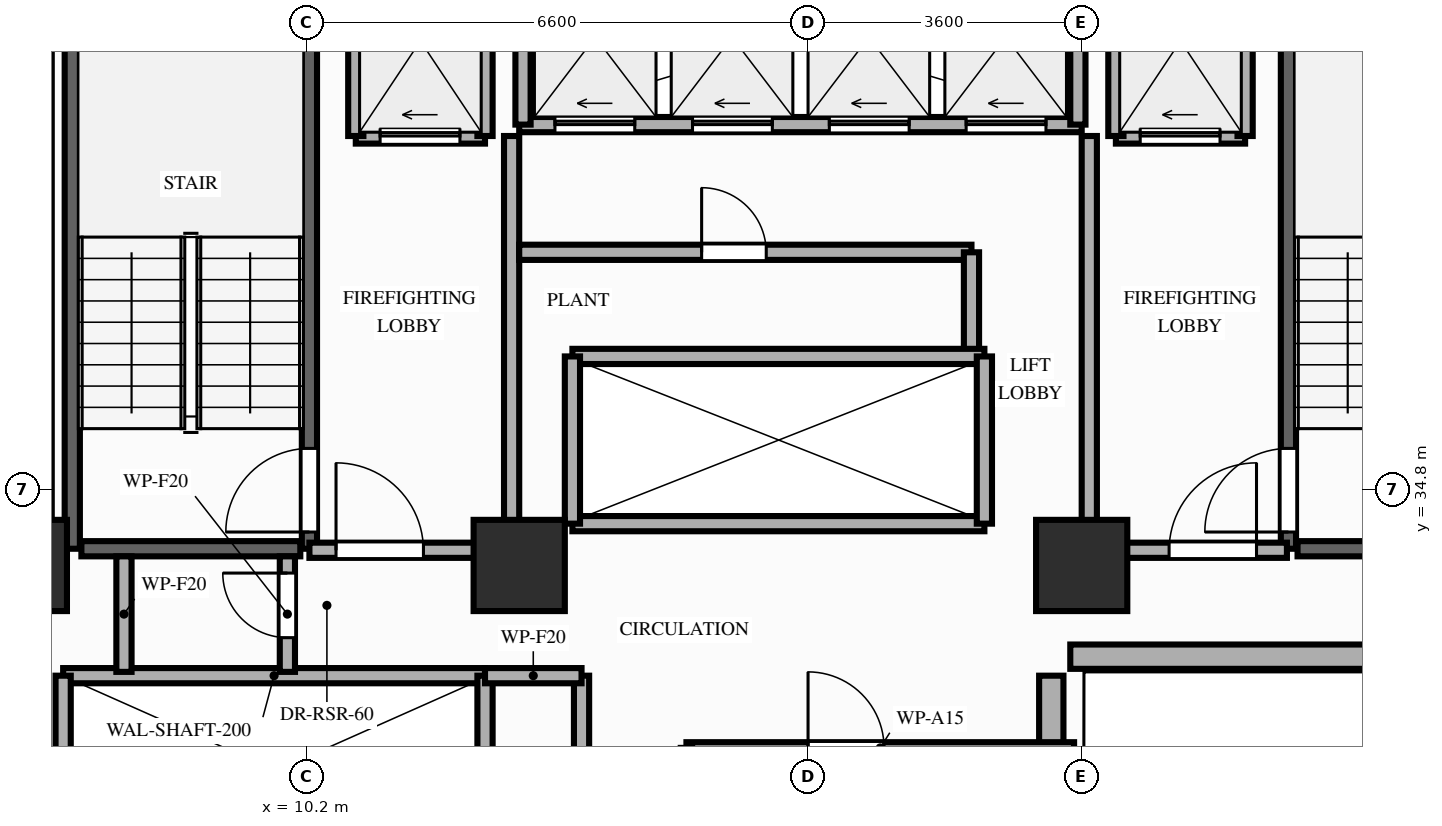
"""IFC4 building model, lengths in metres.
Left out: names, types, materials, properties, quantities, classifications, styles, units other than length and angle.
Written with IfcOpenShell. Run it as: python <this file> out.ifc"""

import sys

from ifc_helpers import new_model, si_unit, direction, frame, frame_2d, origin, origin_2d, place, context, subcontext, project, spatial, rectangle, extrude, element, fill, save


model = new_model("IFC4")
c1 = context("Model", 3, precision=1e-05, world=origin(), true_north=direction((0.0, 1.0)))
c2 = subcontext(c1, "Body", "Model", "MODEL_VIEW")
j1 = project(units=[si_unit("LENGTHUNIT", "METRE"), si_unit("PLANEANGLEUNIT", "RADIAN")], contexts=[c1])
p1 = place(None, origin())
s1 = spatial("IfcSite", under=j1, at=p1, CompositionType="ELEMENT")
p2 = place(p1, origin())
s2 = spatial("IfcBuilding", under=s1, at=p2, CompositionType="ELEMENT")
p3 = place(p2, frame((0.0, 0.0, 30.2)))
s3 = spatial("IfcBuildingStorey", under=s2, at=p3, CompositionType="ELEMENT", Elevation=30.2)
for number, where, z_axis, x_axis in (
    (1, (6.45, 33.8, 0.0), (0.0, 0.0, 1.0), (1.0, 0.0, 0.0)),
    (2, (13.0, 33.8, 0.0), (0.0, 0.0, 1.0), (1.0, 0.0, 0.0)),
    (3, (20.4, 33.8, 0.0), (0.0, 0.0, 1.0), (1.0, 0.0, 0.0)),
):
    element("IfcColumn", number, at=place(p3, frame(where, z_axis=z_axis, x_axis=x_axis)), inside=s3, PredefinedType="COLUMN", context=c2, shape_type="SweptSolid", body=[
        extrude(rectangle(XDim=1.2, YDim=1.2, at=origin_2d()), origin(), (0.0, 0.0, 1.0), 3.2),
    ])
p4 = place(p3, frame((20.0, 8.8, 0.0), z_axis=(0.0, 0.0, 1.0), x_axis=(0.0, 1.0, 0.0)))
e4 = element("IfcWall", 4, at=p4, inside=s3, PredefinedType="STANDARD", context=c2, shape_type="SweptSolid", body=[
    extrude(rectangle(XDim=23.55, YDim=0.32, at=frame_2d((11.775, 0.0))), origin(), (0.0, 0.0, 1.0), 2.41),
])
p5 = place(p4, frame((12.61, 0.0, 0.85)))
e5 = element("IfcOpeningElement", 5, at=p5, cuts=e4, PredefinedType="OPENING", context=c2, shape_type="SweptSolid", body=[
    extrude(rectangle(XDim=1.1, YDim=1.31, at=frame_2d((0.55, 0.655))), frame((0.0, 0.17, 0.0), z_axis=(0.0, -1.0, 0.0), x_axis=(1.0, 0.0, 0.0)), (0.0, 0.0, 1.0), 0.34),
])
p6 = place(p4, frame((5.15, 0.0, 0.85)))
e6 = element("IfcOpeningElement", 6, at=p6, cuts=e4, PredefinedType="OPENING", context=c2, shape_type="SweptSolid", body=[
    extrude(rectangle(XDim=2.4, YDim=1.31, at=frame_2d((1.2, 0.655))), frame((0.0, 0.17, 0.0), z_axis=(0.0, -1.0, 0.0), x_axis=(1.0, 0.0, 0.0)), (0.0, 0.0, 1.0), 0.34),
])
p7 = place(p3, frame((20.25, 32.6, 0.0), z_axis=(0.0, 0.0, 1.0), x_axis=(1.0, 0.0, 0.0)))
e7 = element("IfcWall", 7, at=p7, inside=s3, PredefinedType="STANDARD", context=c2, shape_type="SweptSolid", body=[
    extrude(rectangle(XDim=7.35, YDim=0.32, at=frame_2d((3.675, 0.0))), origin(), (0.0, 0.0, 1.0), 2.41),
])
p8 = place(p3, frame((7.12, 34.02, 0.0), z_axis=(0.0, 0.0, 1.0), x_axis=(0.0, 1.0, 0.0)))
e8 = element("IfcWall", 8, at=p8, inside=s3, PredefinedType="SHEAR", context=c2, shape_type="SweptSolid", body=[
    extrude(rectangle(XDim=7.78, YDim=0.2, at=frame_2d((3.89, 0.0))), origin(), (0.0, 0.0, 1.0), 3.02),
])
p9 = place(p3, frame((10.24, 34.02, 0.0), z_axis=(0.0, 0.0, 1.0), x_axis=(0.0, 1.0, 0.0)))
e9 = element("IfcWall", 9, at=p9, inside=s3, PredefinedType="SHEAR", context=c2, shape_type="SweptSolid", body=[
    extrude(rectangle(XDim=7.78, YDim=0.2, at=frame_2d((3.89, 0.0))), origin(), (0.0, 0.0, 1.0), 3.02),
])
p10 = place(p9, frame((0.22, 0.0, 0.0)))
e10 = element("IfcOpeningElement", 10, at=p10, cuts=e9, PredefinedType="OPENING", context=c2, shape_type="SweptSolid", body=[
    extrude(rectangle(XDim=1.1, YDim=2.15, at=frame_2d((0.55, 1.075))), frame((0.0, 0.11, 0.0), z_axis=(0.0, -1.0, 0.0), x_axis=(1.0, 0.0, 0.0)), (0.0, 0.0, 1.0), 0.22),
])
p11 = place(p3, frame((7.24, 34.02, 0.0), z_axis=(0.0, 0.0, 1.0), x_axis=(1.0, 0.0, 0.0)))
e11 = element("IfcWall", 11, at=p11, inside=s3, PredefinedType="SHEAR", context=c2, shape_type="SweptSolid", body=[
    extrude(rectangle(XDim=2.88, YDim=0.2, at=frame_2d((1.44, 0.0))), origin(), (0.0, 0.0, 1.0), 3.02),
])
p12 = place(p3, frame((23.12, 34.02, 0.0), z_axis=(0.0, 0.0, 1.0), x_axis=(0.0, 1.0, 0.0)))
e12 = element("IfcWall", 12, at=p12, inside=s3, PredefinedType="SHEAR", context=c2, shape_type="SweptSolid", body=[
    extrude(rectangle(XDim=7.78, YDim=0.2, at=frame_2d((3.89, 0.0))), origin(), (0.0, 0.0, 1.0), 3.02),
])
p13 = place(p12, frame((0.22, 0.0, 0.0)))
e13 = element("IfcOpeningElement", 13, at=p13, cuts=e12, PredefinedType="OPENING", context=c2, shape_type="SweptSolid", body=[
    extrude(rectangle(XDim=1.1, YDim=2.15, at=frame_2d((0.55, 1.075))), frame((0.0, 0.11, 0.0), z_axis=(0.0, -1.0, 0.0), x_axis=(1.0, 0.0, 0.0)), (0.0, 0.0, 1.0), 0.22),
])
p14 = place(p3, frame((23.24, 34.02, 0.0), z_axis=(0.0, 0.0, 1.0), x_axis=(1.0, 0.0, 0.0)))
e14 = element("IfcWall", 14, at=p14, inside=s3, PredefinedType="SHEAR", context=c2, shape_type="SweptSolid", body=[
    extrude(rectangle(XDim=2.88, YDim=0.2, at=frame_2d((1.44, 0.0))), origin(), (0.0, 0.0, 1.0), 3.02),
])
p15 = place(p3, frame((7.0, 32.35, 0.0), z_axis=(0.0, 0.0, 1.0), x_axis=(1.0, 0.0, 0.0)))
e15 = element("IfcWall", 15, at=p15, inside=s3, PredefinedType="MOVABLE", context=c2, shape_type="SweptSolid", body=[
    extrude(rectangle(XDim=5.55, YDim=0.2, at=frame_2d((2.775, 0.0))), origin(), (0.0, 0.0, 1.0), 3.02),
])
for number, where, z_axis, x_axis in (
    (16, (7.0, 29.85, 0.0), (0.0, 0.0, 1.0), (0.0, 1.0, 0.0)),
    (17, (12.55, 29.85, 0.0), (0.0, 0.0, 1.0), (0.0, 1.0, 0.0)),
):
    element("IfcWall", number, at=place(p3, frame(where, z_axis=z_axis, x_axis=x_axis)), inside=s3, PredefinedType="MOVABLE", context=c2, shape_type="SweptSolid", body=[
        extrude(rectangle(XDim=2.5, YDim=0.2, at=frame_2d((1.25, 0.0))), origin(), (0.0, 0.0, 1.0), 3.02),
    ])
p16 = place(p3, frame((10.85, 39.45, 0.0), z_axis=(0.0, 0.0, 1.0), x_axis=(1.0, 0.0, 0.0)))
e18 = element("IfcWall", 18, at=p16, inside=s3, PredefinedType="MOVABLE", context=c2, shape_type="SweptSolid", body=[
    extrude(rectangle(XDim=1.7, YDim=0.2, at=frame_2d((0.85, 0.0))), origin(), (0.0, 0.0, 1.0), 3.02),
])
p17 = place(p16, frame((0.32, 0.0, 0.0)))
e19 = element("IfcOpeningElement", 19, at=p17, cuts=e18, PredefinedType="OPENING", context=c2, shape_type="SweptSolid", body=[
    extrude(rectangle(XDim=1.05, YDim=2.15, at=frame_2d((0.525, 1.075))), frame((0.0, 0.11, 0.0), z_axis=(0.0, -1.0, 0.0), x_axis=(1.0, 0.0, 0.0)), (0.0, 0.0, 1.0), 0.22),
])
p18 = place(p3, frame((20.85, 39.45, 0.0), z_axis=(0.0, 0.0, 1.0), x_axis=(1.0, 0.0, 0.0)))
e20 = element("IfcWall", 20, at=p18, inside=s3, PredefinedType="MOVABLE", context=c2, shape_type="SweptSolid", body=[
    extrude(rectangle(XDim=1.7, YDim=0.2, at=frame_2d((0.85, 0.0))), origin(), (0.0, 0.0, 1.0), 3.02),
])
p19 = place(p18, frame((0.32, 0.0, 0.0)))
e21 = element("IfcOpeningElement", 21, at=p19, cuts=e20, PredefinedType="OPENING", context=c2, shape_type="SweptSolid", body=[
    extrude(rectangle(XDim=1.05, YDim=2.15, at=frame_2d((0.525, 1.075))), frame((0.0, 0.11, 0.0), z_axis=(0.0, -1.0, 0.0), x_axis=(1.0, 0.0, 0.0)), (0.0, 0.0, 1.0), 0.22),
])
for number, where, z_axis, x_axis in (
    (22, (10.85, 39.45, 0.0), (0.0, 0.0, 1.0), (0.0, 1.0, 0.0)),
    (23, (12.55, 39.45, 0.0), (0.0, 0.0, 1.0), (0.0, 1.0, 0.0)),
):
    element("IfcWall", number, at=place(p3, frame(where, z_axis=z_axis, x_axis=x_axis)), inside=s3, PredefinedType="MOVABLE", context=c2, shape_type="SweptSolid", body=[
        extrude(rectangle(XDim=2.65, YDim=0.2, at=frame_2d((1.325, 0.0))), origin(), (0.0, 0.0, 1.0), 2.41),
    ])
p20 = place(p3, frame((12.9, 34.0, 0.0), z_axis=(0.0, 0.0, 1.0), x_axis=(0.0, 1.0, 0.0)))
e24 = element("IfcWall", 24, at=p20, inside=s3, PredefinedType="PARTITIONING", context=c2, shape_type="SweptSolid", body=[
    extrude(rectangle(XDim=5.45, YDim=0.2, at=frame_2d((2.725, 0.0))), origin(), (0.0, 0.0, 1.0), 2.41),
])
p21 = place(p3, frame((10.24, 34.0, 0.0), z_axis=(0.0, 0.0, 1.0), x_axis=(1.0, 0.0, 0.0)))
e25 = element("IfcWall", 25, at=p21, inside=s3, PredefinedType="PARTITIONING", context=c2, shape_type="SweptSolid", body=[
    extrude(rectangle(XDim=2.66, YDim=0.2, at=frame_2d((1.33, 0.0))), origin(), (0.0, 0.0, 1.0), 2.41),
])
p22 = place(p21, frame((0.35, 0.0, 0.0)))
e26 = element("IfcOpeningElement", 26, at=p22, cuts=e25, PredefinedType="OPENING", context=c2, shape_type="SweptSolid", body=[
    extrude(rectangle(XDim=1.15, YDim=2.15, at=frame_2d((0.575, 1.075))), frame((0.0, 0.11, 0.0), z_axis=(0.0, -1.0, 0.0), x_axis=(1.0, 0.0, 0.0)), (0.0, 0.0, 1.0), 0.22),
])
for number, where, z_axis, x_axis in (
    (27, (20.85, 39.45, 0.0), (0.0, 0.0, 1.0), (0.0, 1.0, 0.0)),
    (28, (22.55, 39.45, 0.0), (0.0, 0.0, 1.0), (0.0, 1.0, 0.0)),
):
    element("IfcWall", number, at=place(p3, frame(where, z_axis=z_axis, x_axis=x_axis)), inside=s3, PredefinedType="MOVABLE", context=c2, shape_type="SweptSolid", body=[
        extrude(rectangle(XDim=2.65, YDim=0.2, at=frame_2d((1.325, 0.0))), origin(), (0.0, 0.0, 1.0), 2.41),
    ])
p23 = place(p3, frame((20.5, 34.0, 0.0), z_axis=(0.0, 0.0, 1.0), x_axis=(0.0, 1.0, 0.0)))
e29 = element("IfcWall", 29, at=p23, inside=s3, PredefinedType="PARTITIONING", context=c2, shape_type="SweptSolid", body=[
    extrude(rectangle(XDim=5.45, YDim=0.2, at=frame_2d((2.725, 0.0))), origin(), (0.0, 0.0, 1.0), 2.41),
])
p24 = place(p3, frame((20.5, 34.0, 0.0), z_axis=(0.0, 0.0, 1.0), x_axis=(1.0, 0.0, 0.0)))
e30 = element("IfcWall", 30, at=p24, inside=s3, PredefinedType="PARTITIONING", context=c2, shape_type="SweptSolid", body=[
    extrude(rectangle(XDim=2.6, YDim=0.2, at=frame_2d((1.3, 0.0))), origin(), (0.0, 0.0, 1.0), 2.41),
])
p25 = place(p24, frame((1.05, 0.0, 0.0)))
e31 = element("IfcOpeningElement", 31, at=p25, cuts=e30, PredefinedType="OPENING", context=c2, shape_type="SweptSolid", body=[
    extrude(rectangle(XDim=1.15, YDim=2.15, at=frame_2d((0.575, 1.075))), frame((0.0, 0.11, 0.0), z_axis=(0.0, -1.0, 0.0), x_axis=(1.0, 0.0, 0.0)), (0.0, 0.0, 1.0), 0.22),
])
p26 = place(p3, frame((13.82, 29.85, 0.0), z_axis=(0.0, 0.0, 1.0), x_axis=(0.0, 1.0, 0.0)))
e32 = element("IfcWall", 32, at=p26, inside=s3, PredefinedType="PARTITIONING", context=c2, shape_type="SweptSolid", body=[
    extrude(rectangle(XDim=2.5, YDim=0.2, at=frame_2d((1.25, 0.0))), origin(), (0.0, 0.0, 1.0), 3.02),
])
p27 = place(p3, frame((12.55, 32.35, 0.0), z_axis=(0.0, 0.0, 1.0), x_axis=(1.0, 0.0, 0.0)))
e33 = element("IfcWall", 33, at=p27, inside=s3, PredefinedType="PARTITIONING", context=c2, shape_type="SweptSolid", body=[
    extrude(rectangle(XDim=1.27, YDim=0.2, at=frame_2d((0.635, 0.0))), origin(), (0.0, 0.0, 1.0), 3.02),
])
p28 = place(p3, frame((7.8, 32.4, 0.0), z_axis=(0.0, 0.0, 1.0), x_axis=(0.0, 1.0, 0.0)))
e34 = element("IfcWall", 34, at=p28, inside=s3, PredefinedType="PARTITIONING", context=c2, shape_type="SweptSolid", body=[
    extrude(rectangle(XDim=1.52, YDim=0.2, at=frame_2d((0.76, 0.0))), origin(), (0.0, 0.0, 1.0), 2.41),
])
p29 = place(p3, frame((9.95, 32.4, 0.0), z_axis=(0.0, 0.0, 1.0), x_axis=(0.0, 1.0, 0.0)))
e35 = element("IfcWall", 35, at=p29, inside=s3, PredefinedType="PARTITIONING", context=c2, shape_type="SweptSolid", body=[
    extrude(rectangle(XDim=1.52, YDim=0.2, at=frame_2d((0.76, 0.0))), origin(), (0.0, 0.0, 1.0), 2.41),
])
p30 = place(p29, frame((0.45, 0.0, 0.0)))
e36 = element("IfcOpeningElement", 36, at=p30, cuts=e35, PredefinedType="OPENING", context=c2, shape_type="SweptSolid", body=[
    extrude(rectangle(XDim=0.85, YDim=2.05, at=frame_2d((0.425, 1.025))), frame((0.0, 0.11, 0.0), z_axis=(0.0, -1.0, 0.0), x_axis=(1.0, 0.0, 0.0)), (0.0, 0.0, 1.0), 0.22),
])
p31 = place(p3, frame((13.0, 39.6, 0.0), z_axis=(0.0, 0.0, 1.0), x_axis=(1.0, 0.0, 0.0)))
e37 = element("IfcWall", 37, at=p31, inside=s3, PredefinedType="MOVABLE", context=c2, shape_type="SweptSolid", body=[
    extrude(rectangle(XDim=7.4, YDim=0.2, at=frame_2d((3.7, 0.0))), origin(), (0.0, 0.0, 1.0), 3.02),
])
p32 = place(p31, frame((0.47, 0.0, 0.0)))
e38 = element("IfcOpeningElement", 38, at=p32, cuts=e37, PredefinedType="OPENING", context=c2, shape_type="SweptSolid", body=[
    extrude(rectangle(XDim=1.05, YDim=2.15, at=frame_2d((0.525, 1.075))), frame((0.0, 0.11, 0.0), z_axis=(0.0, -1.0, 0.0), x_axis=(1.0, 0.0, 0.0)), (0.0, 0.0, 1.0), 0.22),
])
p33 = place(p31, frame((2.28, 0.0, 0.0)))
e39 = element("IfcOpeningElement", 39, at=p33, cuts=e37, PredefinedType="OPENING", context=c2, shape_type="SweptSolid", body=[
    extrude(rectangle(XDim=1.05, YDim=2.15, at=frame_2d((0.525, 1.075))), frame((0.0, 0.11, 0.0), z_axis=(0.0, -1.0, 0.0), x_axis=(1.0, 0.0, 0.0)), (0.0, 0.0, 1.0), 0.22),
])
p34 = place(p31, frame((4.08, 0.0, 0.0)))
e40 = element("IfcOpeningElement", 40, at=p34, cuts=e37, PredefinedType="OPENING", context=c2, shape_type="SweptSolid", body=[
    extrude(rectangle(XDim=1.05, YDim=2.15, at=frame_2d((0.525, 1.075))), frame((0.0, 0.11, 0.0), z_axis=(0.0, -1.0, 0.0), x_axis=(1.0, 0.0, 0.0)), (0.0, 0.0, 1.0), 0.22),
])
p35 = place(p31, frame((5.88, 0.0, 0.0)))
e41 = element("IfcOpeningElement", 41, at=p35, cuts=e37, PredefinedType="OPENING", context=c2, shape_type="SweptSolid", body=[
    extrude(rectangle(XDim=1.05, YDim=2.15, at=frame_2d((0.525, 1.075))), frame((0.0, 0.11, 0.0), z_axis=(0.0, -1.0, 0.0), x_axis=(1.0, 0.0, 0.0)), (0.0, 0.0, 1.0), 0.22),
])
for number, where, z_axis, x_axis in (
    (42, (13.05, 39.6, 0.0), (0.0, 0.0, 1.0), (0.0, 1.0, 0.0)),
    (43, (20.35, 39.6, 0.0), (0.0, 0.0, 1.0), (0.0, 1.0, 0.0)),
):
    element("IfcWall", number, at=place(p3, frame(where, z_axis=z_axis, x_axis=x_axis)), inside=s3, PredefinedType="MOVABLE", context=c2, shape_type="SweptSolid", body=[
        extrude(rectangle(XDim=2.18, YDim=0.2, at=frame_2d((1.09, 0.0))), origin(), (0.0, 0.0, 1.0), 3.02),
    ])
p36 = place(p3, frame((13.0, 37.92, 0.0), z_axis=(0.0, 0.0, 1.0), x_axis=(1.0, 0.0, 0.0)))
e44 = element("IfcWall", 44, at=p36, inside=s3, PredefinedType="PARTITIONING", context=c2, shape_type="SweptSolid", body=[
    extrude(rectangle(XDim=5.95, YDim=0.2, at=frame_2d((2.975, 0.0))), origin(), (0.0, 0.0, 1.0), 3.02),
])
p37 = place(p36, frame((2.4, 0.0, 0.0)))
e45 = element("IfcOpeningElement", 45, at=p37, cuts=e44, PredefinedType="OPENING", context=c2, shape_type="SweptSolid", body=[
    extrude(rectangle(XDim=0.85, YDim=2.05, at=frame_2d((0.425, 1.025))), frame((0.0, 0.11, 0.0), z_axis=(0.0, -1.0, 0.0), x_axis=(1.0, 0.0, 0.0)), (0.0, 0.0, 1.0), 0.22),
])
p38 = place(p3, frame((18.95, 36.6, 0.0), z_axis=(0.0, 0.0, 1.0), x_axis=(0.0, 1.0, 0.0)))
e46 = element("IfcWall", 46, at=p38, inside=s3, PredefinedType="PARTITIONING", context=c2, shape_type="SweptSolid", body=[
    extrude(rectangle(XDim=1.32, YDim=0.2, at=frame_2d((0.66, 0.0))), origin(), (0.0, 0.0, 1.0), 3.02),
])
for number, where, z_axis, x_axis in (
    (47, (13.7, 34.35, 0.0), (0.0, 0.0, 1.0), (1.0, 0.0, 0.0)),
    (48, (13.7, 36.55, 0.0), (0.0, 0.0, 1.0), (1.0, 0.0, 0.0)),
):
    element("IfcWall", number, at=place(p3, frame(where, z_axis=z_axis, x_axis=x_axis)), inside=s3, PredefinedType="MOVABLE", context=c2, shape_type="SweptSolid", body=[
        extrude(rectangle(XDim=5.42, YDim=0.2, at=frame_2d((2.71, 0.0))), origin(), (0.0, 0.0, 1.0), 3.02),
    ])
for number, where, z_axis, x_axis in (
    (49, (13.7, 34.35, 0.0), (0.0, 0.0, 1.0), (0.0, 1.0, 0.0)),
    (50, (19.12, 34.35, 0.0), (0.0, 0.0, 1.0), (0.0, 1.0, 0.0)),
):
    element("IfcWall", number, at=place(p3, frame(where, z_axis=z_axis, x_axis=x_axis)), inside=s3, PredefinedType="MOVABLE", context=c2, shape_type="SweptSolid", body=[
        extrude(rectangle(XDim=2.2, YDim=0.2, at=frame_2d((1.1, 0.0))), origin(), (0.0, 0.0, 1.0), 3.02),
    ])
p39 = place(p3, frame((15.2, 31.4, 0.0), z_axis=(0.0, 0.0, 1.0), x_axis=(1.0, 0.0, 0.0)))
e51 = element("IfcWall", 51, at=p39, inside=s3, PredefinedType="PARTITIONING", context=c2, shape_type="SweptSolid", body=[
    extrude(rectangle(XDim=5.1, YDim=0.15, at=frame_2d((2.55, 0.0))), origin(), (0.0, 0.0, 1.0), 2.41),
])
p40 = place(p39, frame((1.6, 0.0, 0.0)))
e52 = element("IfcOpeningElement", 52, at=p40, cuts=e51, PredefinedType="OPENING", context=c2, shape_type="SweptSolid", body=[
    extrude(rectangle(XDim=1.0, YDim=2.15, at=frame_2d((0.5, 1.075))), frame((0.0, 0.085, 0.0), z_axis=(0.0, -1.0, 0.0), x_axis=(1.0, 0.0, 0.0)), (0.0, 0.0, 1.0), 0.17),
])
p41 = place(p10, origin())
e53 = element("IfcDoor", 53, at=p41, inside=s3, OperationType="SINGLE_SWING_LEFT", PredefinedType="DOOR", context=c2, shape_type="SweptSolid", body=[
    extrude(rectangle(XDim=1.1, YDim=2.15, at=frame_2d((0.55, 1.075))), frame((0.0, 0.025, 0.0), z_axis=(0.0, -1.0, 0.0), x_axis=(1.0, 0.0, 0.0)), (0.0, 0.0, 1.0), 0.05),
])
fill(e10, e53)
p42 = place(p13, origin())
e54 = element("IfcDoor", 54, at=p42, inside=s3, OperationType="SINGLE_SWING_LEFT", PredefinedType="DOOR", context=c2, shape_type="SweptSolid", body=[
    extrude(rectangle(XDim=1.1, YDim=2.15, at=frame_2d((0.55, 1.075))), frame((0.0, 0.025, 0.0), z_axis=(0.0, -1.0, 0.0), x_axis=(1.0, 0.0, 0.0)), (0.0, 0.0, 1.0), 0.05),
])
fill(e13, e54)
p43 = place(p17, origin())
e55 = element("IfcDoor", 55, at=p43, inside=s3, OperationType="SLIDING_TO_LEFT", PredefinedType="DOOR", context=c2, shape_type="SweptSolid", body=[
    extrude(rectangle(XDim=1.05, YDim=2.15, at=frame_2d((0.525, 1.075))), frame((0.0, 0.025, 0.0), z_axis=(0.0, -1.0, 0.0), x_axis=(1.0, 0.0, 0.0)), (0.0, 0.0, 1.0), 0.05),
])
fill(e19, e55)
p44 = place(p19, origin())
e56 = element("IfcDoor", 56, at=p44, inside=s3, OperationType="SLIDING_TO_LEFT", PredefinedType="DOOR", context=c2, shape_type="SweptSolid", body=[
    extrude(rectangle(XDim=1.05, YDim=2.15, at=frame_2d((0.525, 1.075))), frame((0.0, 0.025, 0.0), z_axis=(0.0, -1.0, 0.0), x_axis=(1.0, 0.0, 0.0)), (0.0, 0.0, 1.0), 0.05),
])
fill(e21, e56)
p45 = place(p22, origin())
e57 = element("IfcDoor", 57, at=p45, inside=s3, OperationType="SINGLE_SWING_LEFT", PredefinedType="DOOR", context=c2, shape_type="SweptSolid", body=[
    extrude(rectangle(XDim=1.15, YDim=2.15, at=frame_2d((0.575, 1.075))), frame((0.0, 0.025, 0.0), z_axis=(0.0, -1.0, 0.0), x_axis=(1.0, 0.0, 0.0)), (0.0, 0.0, 1.0), 0.05),
])
fill(e26, e57)
p46 = place(p25, origin())
e58 = element("IfcDoor", 58, at=p46, inside=s3, OperationType="SINGLE_SWING_RIGHT", PredefinedType="DOOR", context=c2, shape_type="SweptSolid", body=[
    extrude(rectangle(XDim=1.15, YDim=2.15, at=frame_2d((0.575, 1.075))), frame((0.0, 0.025, 0.0), z_axis=(0.0, -1.0, 0.0), x_axis=(1.0, 0.0, 0.0)), (0.0, 0.0, 1.0), 0.05),
])
fill(e31, e58)
p47 = place(p30, origin())
e59 = element("IfcDoor", 59, at=p47, inside=s3, OperationType="SINGLE_SWING_RIGHT", PredefinedType="DOOR", context=c2, shape_type="SweptSolid", body=[
    extrude(rectangle(XDim=0.85, YDim=2.05, at=frame_2d((0.425, 1.025))), frame((0.0, 0.025, 0.0), z_axis=(0.0, -1.0, 0.0), x_axis=(1.0, 0.0, 0.0)), (0.0, 0.0, 1.0), 0.05),
])
fill(e36, e59)
p48 = place(p32, origin())
e60 = element("IfcDoor", 60, at=p48, inside=s3, OperationType="SLIDING_TO_LEFT", PredefinedType="DOOR", context=c2, shape_type="SweptSolid", body=[
    extrude(rectangle(XDim=1.05, YDim=2.15, at=frame_2d((0.525, 1.075))), frame((0.0, 0.025, 0.0), z_axis=(0.0, -1.0, 0.0), x_axis=(1.0, 0.0, 0.0)), (0.0, 0.0, 1.0), 0.05),
])
fill(e38, e60)
p49 = place(p33, origin())
e61 = element("IfcDoor", 61, at=p49, inside=s3, OperationType="SLIDING_TO_LEFT", PredefinedType="DOOR", context=c2, shape_type="SweptSolid", body=[
    extrude(rectangle(XDim=1.05, YDim=2.15, at=frame_2d((0.525, 1.075))), frame((0.0, 0.025, 0.0), z_axis=(0.0, -1.0, 0.0), x_axis=(1.0, 0.0, 0.0)), (0.0, 0.0, 1.0), 0.05),
])
fill(e39, e61)
p50 = place(p34, origin())
e62 = element("IfcDoor", 62, at=p50, inside=s3, OperationType="SLIDING_TO_LEFT", PredefinedType="DOOR", context=c2, shape_type="SweptSolid", body=[
    extrude(rectangle(XDim=1.05, YDim=2.15, at=frame_2d((0.525, 1.075))), frame((0.0, 0.025, 0.0), z_axis=(0.0, -1.0, 0.0), x_axis=(1.0, 0.0, 0.0)), (0.0, 0.0, 1.0), 0.05),
])
fill(e40, e62)
p51 = place(p35, origin())
e63 = element("IfcDoor", 63, at=p51, inside=s3, OperationType="SLIDING_TO_LEFT", PredefinedType="DOOR", context=c2, shape_type="SweptSolid", body=[
    extrude(rectangle(XDim=1.05, YDim=2.15, at=frame_2d((0.525, 1.075))), frame((0.0, 0.025, 0.0), z_axis=(0.0, -1.0, 0.0), x_axis=(1.0, 0.0, 0.0)), (0.0, 0.0, 1.0), 0.05),
])
fill(e41, e63)
p52 = place(p37, origin())
e64 = element("IfcDoor", 64, at=p52, inside=s3, OperationType="SINGLE_SWING_LEFT", PredefinedType="DOOR", context=c2, shape_type="SweptSolid", body=[
    extrude(rectangle(XDim=0.85, YDim=2.05, at=frame_2d((0.425, 1.025))), frame((0.0, 0.025, 0.0), z_axis=(0.0, -1.0, 0.0), x_axis=(1.0, 0.0, 0.0)), (0.0, 0.0, 1.0), 0.05),
])
fill(e45, e64)
p53 = place(p40, origin())
e65 = element("IfcDoor", 65, at=p53, inside=s3, OperationType="SINGLE_SWING_LEFT", PredefinedType="DOOR", context=c2, shape_type="SweptSolid", body=[
    extrude(rectangle(XDim=1.0, YDim=2.15, at=frame_2d((0.5, 1.075))), frame((0.0, 0.025, 0.0), z_axis=(0.0, -1.0, 0.0), x_axis=(1.0, 0.0, 0.0)), (0.0, 0.0, 1.0), 0.05),
])
fill(e52, e65)
save(model, sys.argv[1])
